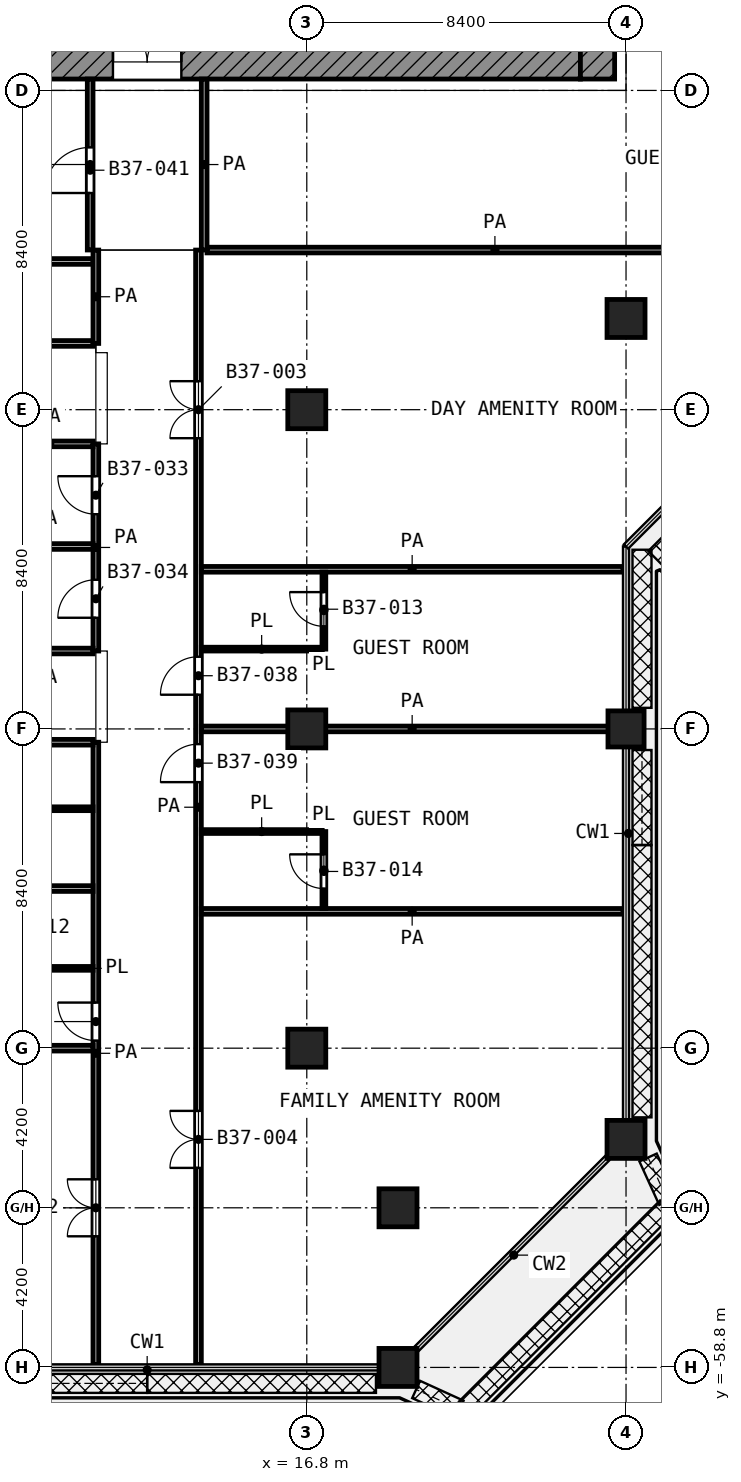
"""IFC4 building model, lengths in metres.
Left out: names, types, materials, properties, quantities, classifications, styles, units other than length and angle.
Written with IfcOpenShell. Run it as: python <this file> out.ifc"""

import sys

from ifc_helpers import new_model, si_unit, direction, frame, frame_2d, origin, origin_2d, place, context, subcontext, project, spatial, rectangle, extrude, element, fill, save


model = new_model("IFC4")
c1 = context("Model", 3, precision=1e-05, world=origin(), true_north=direction((0.0, 1.0)))
c2 = subcontext(c1, "Body", "Model", "MODEL_VIEW")
j1 = project(units=[si_unit("LENGTHUNIT", "METRE"), si_unit("PLANEANGLEUNIT", "RADIAN")], contexts=[c1])
p1 = place(None, origin())
s1 = spatial("IfcSite", under=j1, at=p1, CompositionType="ELEMENT")
p2 = place(p1, origin())
s2 = spatial("IfcBuilding", under=s1, at=p2, CompositionType="ELEMENT")
p3 = place(p2, frame((0.0, 0.0, 162.6)))
s3 = spatial("IfcBuildingStorey", under=s2, at=p3, CompositionType="ELEMENT", Elevation=162.6)
for number, where, z_axis, x_axis in (
    (1, (25.2, -31.2, 0.0), (0.0, 0.0, 1.0), (1.0, 0.0, 0.0)),
    (2, (16.8, -33.6, 0.0), (0.0, 0.0, 1.0), (1.0, 0.0, 0.0)),
    (3, (16.8, -42.0, 0.0), (0.0, 0.0, 1.0), (1.0, 0.0, 0.0)),
):
    element("IfcColumn", number, at=place(p3, frame(where, z_axis=z_axis, x_axis=x_axis)), inside=s3, PredefinedType="COLUMN", context=c2, shape_type="SweptSolid", body=[
        extrude(rectangle(XDim=1.0, YDim=1.0, at=origin_2d()), origin(), (0.0, 0.0, 1.0), 4.2),
    ])
p4 = place(p3, frame((25.2, -42.0, 0.0), z_axis=(0.0, 0.0, 1.0), x_axis=(1.0, 0.0, 0.0)))
e4 = element("IfcColumn", 4, at=p4, inside=s3, PredefinedType="COLUMN", context=c2, shape_type="SweptSolid", body=[
    extrude(rectangle(XDim=0.95, YDim=0.95, at=origin_2d()), origin(), (0.0, 0.0, 1.0), 4.2),
])
for number, where, z_axis, x_axis in (
    (5, (16.8, -50.4, 0.0), (0.0, 0.0, 1.0), (1.0, 0.0, 0.0)),
    (6, (25.2, -52.8, 0.0), (0.0, 0.0, 1.0), (1.0, 0.0, 0.0)),
    (7, (19.2, -54.6, 0.0), (0.0, 0.0, 1.0), (1.0, 0.0, 0.0)),
    (8, (19.2, -58.8, 0.0), (0.0, 0.0, 1.0), (1.0, 0.0, 0.0)),
):
    element("IfcColumn", number, at=place(p3, frame(where, z_axis=z_axis, x_axis=x_axis)), inside=s3, PredefinedType="COLUMN", context=c2, shape_type="SweptSolid", body=[
        extrude(rectangle(XDim=1.0, YDim=1.0, at=origin_2d()), origin(), (0.0, 0.0, 1.0), 4.2),
    ])
p5 = place(p3, frame((5.4, -24.45, 0.0), z_axis=(0.0, 0.0, 1.0), x_axis=(1.0, 0.0, 0.0)))
e9 = element("IfcWall", 9, at=p5, inside=s3, PredefinedType="SHEAR", context=c2, shape_type="SweptSolid", body=[
    extrude(rectangle(XDim=18.6, YDim=0.9, at=frame_2d((9.3, 0.0))), origin(), (0.0, 0.0, 1.0), 3.6),
])
p6 = place(p5, frame((6.3, 0.0, 0.0)))
e10 = element("IfcOpeningElement", 10, at=p6, cuts=e9, PredefinedType="OPENING", context=c2, shape_type="SweptSolid", body=[
    extrude(rectangle(XDim=1.8, YDim=2.1, at=frame_2d((0.9, 1.05))), frame((0.0, 0.46, 0.0), z_axis=(0.0, -1.0, 0.0), x_axis=(1.0, 0.0, 0.0)), (0.0, 0.0, 1.0), 0.92),
])
p7 = place(p3, frame((24.45, -24.9, 0.0), z_axis=(0.0, 0.0, 1.0), x_axis=(0.0, 1.0, 0.0)))
e11 = element("IfcWall", 11, at=p7, inside=s3, PredefinedType="SHEAR", context=c2, shape_type="SweptSolid", body=[
    extrude(rectangle(XDim=0.9, YDim=0.9, at=frame_2d((0.45, 0.0))), origin(), (0.0, 0.0, 1.0), 3.6),
])
for number, where, z_axis, x_axis in (
    (12, (8.0, -48.3, 0.0), (0.0, 0.0, 1.0), (1.0, 0.0, 0.0)),
    (13, (14.025, -44.7, 0.0), (0.0, 0.0, 1.0), (1.0, 0.0, 0.0)),
    (14, (8.0, -44.1, 0.0), (0.0, 0.0, 1.0), (1.0, 0.0, 0.0)),
    (15, (14.025, -39.9, 0.0), (0.0, 0.0, 1.0), (1.0, 0.0, 0.0)),
):
    element("IfcWall", number, at=place(p3, frame(where, z_axis=z_axis, x_axis=x_axis)), inside=s3, PredefinedType="PARTITIONING", context=c2, shape_type="SweptSolid", body=[
        extrude(rectangle(XDim=3.175, YDim=0.1, at=frame_2d((1.587, 0.0))), origin(), (0.0, 0.0, 1.0), 3.6),
    ])
p8 = place(p3, frame((17.25, -46.725, 0.0), z_axis=(0.0, 0.0, 1.0), x_axis=(0.0, 1.0, 0.0)))
e16 = element("IfcWall", 16, at=p8, inside=s3, PredefinedType="PARTITIONING", context=c2, shape_type="SweptSolid", body=[
    extrude(rectangle(XDim=2.025, YDim=0.1, at=frame_2d((1.013, 0.0))), origin(), (0.0, 0.0, 1.0), 3.6),
])
p9 = place(p8, frame((0.525, 0.0, 0.0)))
e17 = element("IfcOpeningElement", 17, at=p9, cuts=e16, PredefinedType="OPENING", context=c2, shape_type="SweptSolid", body=[
    extrude(rectangle(XDim=0.9, YDim=2.1, at=frame_2d((0.45, 1.05))), frame((0.0, 0.06, 0.0), z_axis=(0.0, -1.0, 0.0), x_axis=(1.0, 0.0, 0.0)), (0.0, 0.0, 1.0), 0.12),
])
p10 = place(p3, frame((17.25, -39.9, 0.0), z_axis=(0.0, 0.0, 1.0), x_axis=(0.0, 1.0, 0.0)))
e18 = element("IfcWall", 18, at=p10, inside=s3, PredefinedType="PARTITIONING", context=c2, shape_type="SweptSolid", body=[
    extrude(rectangle(XDim=2.025, YDim=0.1, at=frame_2d((1.012, 0.0))), origin(), (0.0, 0.0, 1.0), 3.6),
])
p11 = place(p10, frame((0.6, 0.0, 0.0)))
e19 = element("IfcOpeningElement", 19, at=p11, cuts=e18, PredefinedType="OPENING", context=c2, shape_type="SweptSolid", body=[
    extrude(rectangle(XDim=0.9, YDim=2.1, at=frame_2d((0.45, 1.05))), frame((0.0, 0.06, 0.0), z_axis=(0.0, -1.0, 0.0), x_axis=(1.0, 0.0, 0.0)), (0.0, 0.0, 1.0), 0.12),
])
p12 = place(p3, frame((0.08, -50.4, 0.0), z_axis=(0.0, 0.0, 1.0), x_axis=(1.0, 0.0, 0.0)))
e20 = element("IfcWall", 20, at=p12, inside=s3, PredefinedType="PARTITIONING", context=c2, shape_type="SweptSolid", body=[
    extrude(rectangle(XDim=11.095, YDim=0.15, at=frame_2d((5.547, 0.0))), origin(), (0.0, 0.0, 1.0), 3.6),
])
p13 = place(p3, frame((14.025, -46.8, 0.0), z_axis=(0.0, 0.0, 1.0), x_axis=(1.0, 0.0, 0.0)))
e21 = element("IfcWall", 21, at=p13, inside=s3, PredefinedType="PARTITIONING", context=c2, shape_type="SweptSolid", body=[
    extrude(rectangle(XDim=11.095, YDim=0.15, at=frame_2d((5.548, 0.0))), origin(), (0.0, 0.0, 1.0), 3.6),
])
p14 = place(p3, frame((0.08, -46.2, 0.0), z_axis=(0.0, 0.0, 1.0), x_axis=(1.0, 0.0, 0.0)))
e22 = element("IfcWall", 22, at=p14, inside=s3, PredefinedType="PARTITIONING", context=c2, shape_type="SweptSolid", body=[
    extrude(rectangle(XDim=11.095, YDim=0.15, at=frame_2d((5.547, 0.0))), origin(), (0.0, 0.0, 1.0), 3.6),
])
p15 = place(p3, frame((2.327, -42.35, 0.0), z_axis=(0.0, 0.0, 1.0), x_axis=(1.0, 0.0, 0.0)))
e23 = element("IfcWall", 23, at=p15, inside=s3, PredefinedType="PARTITIONING", context=c2, shape_type="SweptSolid", body=[
    extrude(rectangle(XDim=8.848, YDim=0.15, at=frame_2d((4.424, 0.0))), origin(), (0.0, 0.0, 1.0), 3.6),
])
p16 = place(p15, frame((4.524, 0.0, 0.0)))
e24 = element("IfcOpeningElement", 24, at=p16, cuts=e23, PredefinedType="OPENING", context=c2, shape_type="SweptSolid", body=[
    extrude(rectangle(XDim=1.0, YDim=2.1, at=frame_2d((0.5, 1.05))), frame((0.0, 0.085, 0.0), z_axis=(0.0, -1.0, 0.0), x_axis=(1.0, 0.0, 0.0)), (0.0, 0.0, 1.0), 0.17),
])
p17 = place(p15, frame((2.424, 0.0, 0.0)))
e25 = element("IfcOpeningElement", 25, at=p17, cuts=e23, PredefinedType="OPENING", context=c2, shape_type="SweptSolid", body=[
    extrude(rectangle(XDim=1.0, YDim=2.1, at=frame_2d((0.5, 1.05))), frame((0.0, 0.085, 0.0), z_axis=(0.0, -1.0, 0.0), x_axis=(1.0, 0.0, 0.0)), (0.0, 0.0, 1.0), 0.17),
])
p18 = place(p3, frame((14.025, -42.0, 0.0), z_axis=(0.0, 0.0, 1.0), x_axis=(1.0, 0.0, 0.0)))
e26 = element("IfcWall", 26, at=p18, inside=s3, PredefinedType="PARTITIONING", context=c2, shape_type="SweptSolid", body=[
    extrude(rectangle(XDim=11.095, YDim=0.15, at=frame_2d((5.548, 0.0))), origin(), (0.0, 0.0, 1.0), 3.6),
])
p19 = place(p3, frame((8.65, -39.95, 0.0), z_axis=(0.0, 0.0, 1.0), x_axis=(1.0, 0.0, 0.0)))
e27 = element("IfcWall", 27, at=p19, inside=s3, PredefinedType="PARTITIONING", context=c2, shape_type="SweptSolid", body=[
    extrude(rectangle(XDim=2.525, YDim=0.15, at=frame_2d((1.263, 0.0))), origin(), (0.0, 0.0, 1.0), 3.6),
])
p20 = place(p3, frame((14.025, -37.8, 0.0), z_axis=(0.0, 0.0, 1.0), x_axis=(1.0, 0.0, 0.0)))
e28 = element("IfcWall", 28, at=p20, inside=s3, PredefinedType="PARTITIONING", context=c2, shape_type="SweptSolid", body=[
    extrude(rectangle(XDim=11.095, YDim=0.15, at=frame_2d((5.548, 0.0))), origin(), (0.0, 0.0, 1.0), 3.6),
])
p21 = place(p3, frame((8.65, -37.2, 0.0), z_axis=(0.0, 0.0, 1.0), x_axis=(1.0, 0.0, 0.0)))
e29 = element("IfcWall", 29, at=p21, inside=s3, PredefinedType="PARTITIONING", context=c2, shape_type="SweptSolid", body=[
    extrude(rectangle(XDim=2.525, YDim=0.15, at=frame_2d((1.263, 0.0))), origin(), (0.0, 0.0, 1.0), 3.6),
])
p22 = place(p3, frame((8.9, -34.5, 0.0), z_axis=(0.0, 0.0, 1.0), x_axis=(1.0, 0.0, 0.0)))
e30 = element("IfcWall", 30, at=p22, inside=s3, PredefinedType="PARTITIONING", context=c2, shape_type="SweptSolid", body=[
    extrude(rectangle(XDim=2.275, YDim=0.15, at=frame_2d((1.138, 0.0))), origin(), (0.0, 0.0, 1.0), 3.6),
])
p23 = place(p3, frame((1.075, -31.857, 0.0), z_axis=(0.0, 0.0, 1.0), x_axis=(1.0, 0.0, 0.0)))
e31 = element("IfcWall", 31, at=p23, inside=s3, PredefinedType="PARTITIONING", context=c2, shape_type="SweptSolid", body=[
    extrude(rectangle(XDim=10.1, YDim=0.15, at=frame_2d((5.05, 0.0))), origin(), (0.0, 0.0, 1.0), 3.6),
])
p24 = place(p23, frame((4.55, 0.0, 0.0)))
e32 = element("IfcOpeningElement", 32, at=p24, cuts=e31, PredefinedType="OPENING", context=c2, shape_type="SweptSolid", body=[
    extrude(rectangle(XDim=1.0, YDim=2.1, at=frame_2d((0.5, 1.05))), frame((0.0, 0.085, 0.0), z_axis=(0.0, -1.0, 0.0), x_axis=(1.0, 0.0, 0.0)), (0.0, 0.0, 1.0), 0.17),
])
p25 = place(p3, frame((0.08, -29.7, 0.0), z_axis=(0.0, 0.0, 1.0), x_axis=(1.0, 0.0, 0.0)))
e33 = element("IfcWall", 33, at=p25, inside=s3, PredefinedType="PARTITIONING", context=c2, shape_type="SweptSolid", body=[
    extrude(rectangle(XDim=11.095, YDim=0.15, at=frame_2d((5.547, 0.0))), origin(), (0.0, 0.0, 1.0), 3.6),
])
p26 = place(p3, frame((14.175, -29.4, 0.0), z_axis=(0.0, 0.0, 1.0), x_axis=(1.0, 0.0, 0.0)))
e34 = element("IfcWall", 34, at=p26, inside=s3, PredefinedType="PARTITIONING", context=c2, shape_type="SweptSolid", body=[
    extrude(rectangle(XDim=15.15, YDim=0.15, at=frame_2d((7.575, 0.0))), origin(), (0.0, 0.0, 1.0), 3.6),
])
p27 = place(p3, frame((11.1, -29.398, 0.0), z_axis=(0.0, 0.0, 1.0), x_axis=(0.0, 1.0, 0.0)))
e35 = element("IfcWall", 35, at=p27, inside=s3, PredefinedType="PARTITIONING", context=c2, shape_type="SweptSolid", body=[
    extrude(rectangle(XDim=4.498, YDim=0.15, at=frame_2d((2.249, 0.0))), origin(), (0.0, 0.0, 1.0), 3.6),
])
p28 = place(p27, frame((1.499, 0.0, 0.0)))
e36 = element("IfcOpeningElement", 36, at=p28, cuts=e35, PredefinedType="OPENING", context=c2, shape_type="SweptSolid", body=[
    extrude(rectangle(XDim=1.2, YDim=2.1, at=frame_2d((0.6, 1.05))), frame((0.0, 0.085, 0.0), z_axis=(0.0, -1.0, 0.0), x_axis=(1.0, 0.0, 0.0)), (0.0, 0.0, 1.0), 0.17),
])
p29 = place(p3, frame((11.25, -58.72, 0.0), z_axis=(0.0, 0.0, 1.0), x_axis=(0.0, 1.0, 0.0)))
e37 = element("IfcWall", 37, at=p29, inside=s3, PredefinedType="PARTITIONING", context=c2, shape_type="SweptSolid", body=[
    extrude(rectangle(XDim=16.37, YDim=0.15, at=frame_2d((8.185, 0.0))), origin(), (0.0, 0.0, 1.0), 3.6),
])
p30 = place(p29, frame((8.52, 0.0, 0.0)))
e38 = element("IfcOpeningElement", 38, at=p30, cuts=e37, PredefinedType="OPENING", context=c2, shape_type="SweptSolid", body=[
    extrude(rectangle(XDim=1.0, YDim=2.1, at=frame_2d((0.5, 1.05))), frame((0.0, 0.085, 0.0), z_axis=(0.0, -1.0, 0.0), x_axis=(1.0, 0.0, 0.0)), (0.0, 0.0, 1.0), 0.17),
])
p31 = place(p29, frame((3.37, 0.0, 0.0)))
e39 = element("IfcOpeningElement", 39, at=p31, cuts=e37, PredefinedType="OPENING", context=c2, shape_type="SweptSolid", body=[
    extrude(rectangle(XDim=1.5, YDim=2.1, at=frame_2d((0.75, 1.05))), frame((0.0, 0.085, 0.0), z_axis=(0.0, -1.0, 0.0), x_axis=(1.0, 0.0, 0.0)), (0.0, 0.0, 1.0), 0.17),
])
p32 = place(p3, frame((11.25, -39.95, 0.0), z_axis=(0.0, 0.0, 1.0), x_axis=(0.0, 1.0, 0.0)))
e40 = element("IfcWall", 40, at=p32, inside=s3, PredefinedType="PARTITIONING", context=c2, shape_type="SweptSolid", body=[
    extrude(rectangle(XDim=5.45, YDim=0.15, at=frame_2d((2.725, 0.0))), origin(), (0.0, 0.0, 1.0), 3.6),
])
p33 = place(p32, frame((3.6, 0.0, 0.0)))
e41 = element("IfcOpeningElement", 41, at=p33, cuts=e40, PredefinedType="OPENING", context=c2, shape_type="SweptSolid", body=[
    extrude(rectangle(XDim=1.0, YDim=2.1, at=frame_2d((0.5, 1.05))), frame((0.0, 0.085, 0.0), z_axis=(0.0, -1.0, 0.0), x_axis=(1.0, 0.0, 0.0)), (0.0, 0.0, 1.0), 0.17),
])
p34 = place(p32, frame((0.875, 0.0, 0.0)))
e42 = element("IfcOpeningElement", 42, at=p34, cuts=e40, PredefinedType="OPENING", context=c2, shape_type="SweptSolid", body=[
    extrude(rectangle(XDim=1.0, YDim=2.1, at=frame_2d((0.5, 1.05))), frame((0.0, 0.085, 0.0), z_axis=(0.0, -1.0, 0.0), x_axis=(1.0, 0.0, 0.0)), (0.0, 0.0, 1.0), 0.17),
])
p35 = place(p3, frame((11.25, -31.857, 0.0), z_axis=(0.0, 0.0, 1.0), x_axis=(0.0, 1.0, 0.0)))
e43 = element("IfcWall", 43, at=p35, inside=s3, PredefinedType="PARTITIONING", context=c2, shape_type="SweptSolid", body=[
    extrude(rectangle(XDim=2.457, YDim=0.15, at=frame_2d((1.229, 0.0))), origin(), (0.0, 0.0, 1.0), 3.6),
])
p36 = place(p3, frame((13.95, -58.72, 0.0), z_axis=(0.0, 0.0, 1.0), x_axis=(0.0, 1.0, 0.0)))
e44 = element("IfcWall", 44, at=p36, inside=s3, PredefinedType="PARTITIONING", context=c2, shape_type="SweptSolid", body=[
    extrude(rectangle(XDim=29.32, YDim=0.15, at=frame_2d((14.66, 0.0))), origin(), (0.0, 0.0, 1.0), 3.6),
])
p37 = place(p36, frame((24.37, 0.0, 0.0)))
e45 = element("IfcOpeningElement", 45, at=p37, cuts=e44, PredefinedType="OPENING", context=c2, shape_type="SweptSolid", body=[
    extrude(rectangle(XDim=1.5, YDim=2.1, at=frame_2d((0.75, 1.05))), frame((0.0, 0.085, 0.0), z_axis=(0.0, -1.0, 0.0), x_axis=(1.0, 0.0, 0.0)), (0.0, 0.0, 1.0), 0.17),
])
p38 = place(p36, frame((17.62, 0.0, 0.0)))
e46 = element("IfcOpeningElement", 46, at=p38, cuts=e44, PredefinedType="OPENING", context=c2, shape_type="SweptSolid", body=[
    extrude(rectangle(XDim=1.0, YDim=2.1, at=frame_2d((0.5, 1.05))), frame((0.0, 0.085, 0.0), z_axis=(0.0, -1.0, 0.0), x_axis=(1.0, 0.0, 0.0)), (0.0, 0.0, 1.0), 0.17),
])
p39 = place(p36, frame((15.32, 0.0, 0.0)))
e47 = element("IfcOpeningElement", 47, at=p39, cuts=e44, PredefinedType="OPENING", context=c2, shape_type="SweptSolid", body=[
    extrude(rectangle(XDim=1.0, YDim=2.1, at=frame_2d((0.5, 1.05))), frame((0.0, 0.085, 0.0), z_axis=(0.0, -1.0, 0.0), x_axis=(1.0, 0.0, 0.0)), (0.0, 0.0, 1.0), 0.17),
])
p40 = place(p36, frame((5.17, 0.0, 0.0)))
e48 = element("IfcOpeningElement", 48, at=p40, cuts=e44, PredefinedType="OPENING", context=c2, shape_type="SweptSolid", body=[
    extrude(rectangle(XDim=1.5, YDim=2.1, at=frame_2d((0.75, 1.05))), frame((0.0, 0.085, 0.0), z_axis=(0.0, -1.0, 0.0), x_axis=(1.0, 0.0, 0.0)), (0.0, 0.0, 1.0), 0.17),
])
p41 = place(p3, frame((14.1, -29.4, 0.0), z_axis=(0.0, 0.0, 1.0), x_axis=(0.0, 1.0, 0.0)))
e49 = element("IfcWall", 49, at=p41, inside=s3, PredefinedType="PARTITIONING", context=c2, shape_type="SweptSolid", body=[
    extrude(rectangle(XDim=4.5, YDim=0.15, at=frame_2d((2.25, 0.0))), origin(), (0.0, 0.0, 1.0), 3.6),
])
p42 = place(p6, origin())
e50 = element("IfcDoor", 50, at=p42, inside=s3, OperationType="DOUBLE_DOOR_SINGLE_SWING", PredefinedType="DOOR", context=c2, shape_type="SweptSolid", body=[
    extrude(rectangle(XDim=1.8, YDim=2.1, at=frame_2d((0.9, 1.05))), frame((0.0, 0.025, 0.0), z_axis=(0.0, -1.0, 0.0), x_axis=(1.0, 0.0, 0.0)), (0.0, 0.0, 1.0), 0.05),
])
fill(e10, e50)
p43 = place(p28, origin())
e51 = element("IfcDoor", 51, at=p43, inside=s3, OperationType="SINGLE_SWING_LEFT", PredefinedType="DOOR", context=c2, shape_type="SweptSolid", body=[
    extrude(rectangle(XDim=1.2, YDim=2.1, at=frame_2d((0.6, 1.05))), frame((0.0, 0.025, 0.0), z_axis=(0.0, -1.0, 0.0), x_axis=(1.0, 0.0, 0.0)), (0.0, 0.0, 1.0), 0.05),
])
fill(e36, e51)
p44 = place(p33, origin())
e52 = element("IfcDoor", 52, at=p44, inside=s3, OperationType="SINGLE_SWING_RIGHT", PredefinedType="DOOR", context=c2, shape_type="SweptSolid", body=[
    extrude(rectangle(XDim=1.0, YDim=2.1, at=frame_2d((0.5, 1.05))), frame((0.0, 0.025, 0.0), z_axis=(0.0, -1.0, 0.0), x_axis=(1.0, 0.0, 0.0)), (0.0, 0.0, 1.0), 0.05),
])
fill(e41, e52)
p45 = place(p34, origin())
e53 = element("IfcDoor", 53, at=p45, inside=s3, OperationType="SINGLE_SWING_LEFT", PredefinedType="DOOR", context=c2, shape_type="SweptSolid", body=[
    extrude(rectangle(XDim=1.0, YDim=2.1, at=frame_2d((0.5, 1.05))), frame((0.0, 0.025, 0.0), z_axis=(0.0, -1.0, 0.0), x_axis=(1.0, 0.0, 0.0)), (0.0, 0.0, 1.0), 0.05),
])
fill(e42, e53)
p46 = place(p30, origin())
e54 = element("IfcDoor", 54, at=p46, inside=s3, OperationType="SINGLE_SWING_RIGHT", PredefinedType="DOOR", context=c2, shape_type="SweptSolid", body=[
    extrude(rectangle(XDim=1.0, YDim=2.1, at=frame_2d((0.5, 1.05))), frame((0.0, 0.025, 0.0), z_axis=(0.0, -1.0, 0.0), x_axis=(1.0, 0.0, 0.0)), (0.0, 0.0, 1.0), 0.05),
])
fill(e38, e54)
p47 = place(p31, origin())
e55 = element("IfcDoor", 55, at=p47, inside=s3, OperationType="DOUBLE_DOOR_SINGLE_SWING", PredefinedType="DOOR", context=c2, shape_type="SweptSolid", body=[
    extrude(rectangle(XDim=1.5, YDim=2.1, at=frame_2d((0.75, 1.05))), frame((0.0, 0.025, 0.0), z_axis=(0.0, -1.0, 0.0), x_axis=(1.0, 0.0, 0.0)), (0.0, 0.0, 1.0), 0.05),
])
fill(e39, e55)
p48 = place(p37, origin())
e56 = element("IfcDoor", 56, at=p48, inside=s3, OperationType="DOUBLE_DOOR_SINGLE_SWING", PredefinedType="DOOR", context=c2, shape_type="SweptSolid", body=[
    extrude(rectangle(XDim=1.5, YDim=2.1, at=frame_2d((0.75, 1.05))), frame((0.0, 0.025, 0.0), z_axis=(0.0, -1.0, 0.0), x_axis=(1.0, 0.0, 0.0)), (0.0, 0.0, 1.0), 0.05),
])
fill(e45, e56)
p49 = place(p38, origin())
e57 = element("IfcDoor", 57, at=p49, inside=s3, OperationType="SINGLE_SWING_LEFT", PredefinedType="DOOR", context=c2, shape_type="SweptSolid", body=[
    extrude(rectangle(XDim=1.0, YDim=2.1, at=frame_2d((0.5, 1.05))), frame((0.0, 0.025, 0.0), z_axis=(0.0, -1.0, 0.0), x_axis=(1.0, 0.0, 0.0)), (0.0, 0.0, 1.0), 0.05),
])
fill(e46, e57)
p50 = place(p11, origin())
e58 = element("IfcDoor", 58, at=p50, inside=s3, OperationType="SINGLE_SWING_RIGHT", PredefinedType="DOOR", context=c2, shape_type="SweptSolid", body=[
    extrude(rectangle(XDim=0.9, YDim=2.1, at=frame_2d((0.45, 1.05))), frame((0.0, 0.025, 0.0), z_axis=(0.0, -1.0, 0.0), x_axis=(1.0, 0.0, 0.0)), (0.0, 0.0, 1.0), 0.05),
])
fill(e19, e58)
p51 = place(p39, origin())
e59 = element("IfcDoor", 59, at=p51, inside=s3, OperationType="SINGLE_SWING_LEFT", PredefinedType="DOOR", context=c2, shape_type="SweptSolid", body=[
    extrude(rectangle(XDim=1.0, YDim=2.1, at=frame_2d((0.5, 1.05))), frame((0.0, 0.025, 0.0), z_axis=(0.0, -1.0, 0.0), x_axis=(1.0, 0.0, 0.0)), (0.0, 0.0, 1.0), 0.05),
])
fill(e47, e59)
p52 = place(p9, origin())
e60 = element("IfcDoor", 60, at=p52, inside=s3, OperationType="SINGLE_SWING_RIGHT", PredefinedType="DOOR", context=c2, shape_type="SweptSolid", body=[
    extrude(rectangle(XDim=0.9, YDim=2.1, at=frame_2d((0.45, 1.05))), frame((0.0, 0.025, 0.0), z_axis=(0.0, -1.0, 0.0), x_axis=(1.0, 0.0, 0.0)), (0.0, 0.0, 1.0), 0.05),
])
fill(e17, e60)
p53 = place(p40, origin())
e61 = element("IfcDoor", 61, at=p53, inside=s3, OperationType="DOUBLE_DOOR_SINGLE_SWING", PredefinedType="DOOR", context=c2, shape_type="SweptSolid", body=[
    extrude(rectangle(XDim=1.5, YDim=2.1, at=frame_2d((0.75, 1.05))), frame((0.0, 0.025, 0.0), z_axis=(0.0, -1.0, 0.0), x_axis=(1.0, 0.0, 0.0)), (0.0, 0.0, 1.0), 0.05),
])
fill(e48, e61)
save(model, sys.argv[1])
